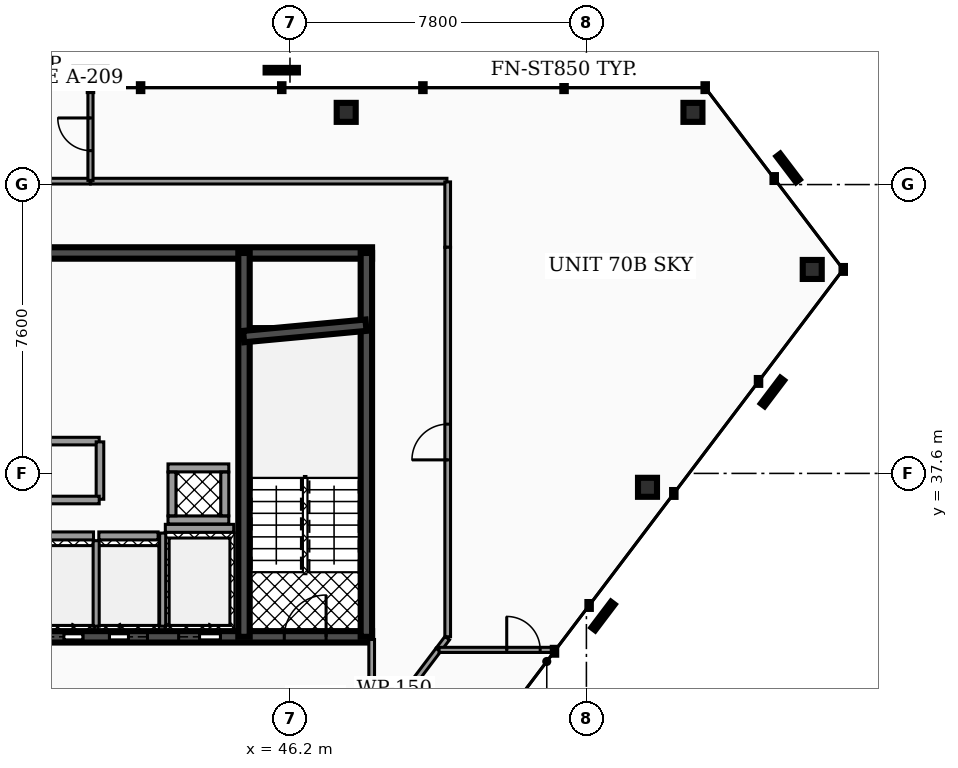
"""IFC4 building model, lengths in metres.
Left out: names, types, materials, properties, quantities, classifications, styles, units other than length and angle.
Written with IfcOpenShell. Run it as: python <this file> out.ifc"""

import sys

from ifc_helpers import new_model, si_unit, direction, frame, frame_2d, origin, origin_2d, place, context, subcontext, project, spatial, rectangle, hollow_rectangle, extrude, element, fill, save


model = new_model("IFC4")
c1 = context("Model", 3, precision=1e-05, world=origin(), true_north=direction((0.0, 1.0)))
c2 = subcontext(c1, "Body", "Model", "MODEL_VIEW")
j1 = project(units=[si_unit("LENGTHUNIT", "METRE"), si_unit("PLANEANGLEUNIT", "RADIAN")], contexts=[c1])
p1 = place(None, origin())
s1 = spatial("IfcSite", under=j1, at=p1, CompositionType="ELEMENT")
p2 = place(p1, origin())
s2 = spatial("IfcBuilding", under=s1, at=p2, CompositionType="ELEMENT")
p3 = place(p2, frame((0.0, 0.0, 275.4)))
s3 = spatial("IfcBuildingStorey", under=s2, at=p3, CompositionType="ELEMENT", Elevation=275.4)
p4 = place(p3, frame((28.5, 43.4, 0.0), z_axis=(0.0, 0.0, 1.0), x_axis=(1.0, 0.0, 0.0)))
e1 = element("IfcWall", 1, at=p4, inside=s3, PredefinedType="SHEAR", context=c2, shape_type="SweptSolid", body=[
    extrude(rectangle(XDim=19.86, YDim=0.3, at=frame_2d((9.93, 0.0))), origin(), (0.0, 0.0, 1.0), 3.18),
])
p5 = place(p3, frame((28.5, 33.3, 0.0), z_axis=(0.0, 0.0, 1.0), x_axis=(1.0, 0.0, 0.0)))
e2 = element("IfcWall", 2, at=p5, inside=s3, PredefinedType="SHEAR", context=c2, shape_type="SweptSolid", body=[
    extrude(rectangle(XDim=19.86, YDim=0.3, at=frame_2d((9.93, 0.0))), origin(), (0.0, 0.0, 1.0), 3.18),
])
p6 = place(p5, frame((3.93, 0.0, 0.0)))
e3 = element("IfcOpeningElement", 3, at=p6, cuts=e2, PredefinedType="OPENING", context=c2, shape_type="SweptSolid", body=[
    extrude(rectangle(XDim=1.1, YDim=2.15, at=frame_2d((0.55, 1.075))), frame((0.0, 0.16, 0.0), z_axis=(0.0, -1.0, 0.0), x_axis=(1.0, 0.0, 0.0)), (0.0, 0.0, 1.0), 0.32),
])
p7 = place(p5, frame((14.77, 0.0, 0.0)))
e4 = element("IfcOpeningElement", 4, at=p7, cuts=e2, PredefinedType="OPENING", context=c2, shape_type="SweptSolid", body=[
    extrude(rectangle(XDim=1.1, YDim=2.15, at=frame_2d((0.55, 1.075))), frame((0.0, 0.16, 0.0), z_axis=(0.0, -1.0, 0.0), x_axis=(1.0, 0.0, 0.0)), (0.0, 0.0, 1.0), 0.32),
])
p8 = place(p5, frame((11.25, 0.0, 0.0)))
e5 = element("IfcOpeningElement", 5, at=p8, cuts=e2, PredefinedType="OPENING", context=c2, shape_type="SweptSolid", body=[
    extrude(rectangle(XDim=1.0, YDim=2.1, at=frame_2d((0.5, 1.05))), frame((0.0, 0.16, 0.0), z_axis=(0.0, -1.0, 0.0), x_axis=(1.0, 0.0, 0.0)), (0.0, 0.0, 1.0), 0.32),
])
p9 = place(p5, frame((12.95, 0.0, 0.0)))
e6 = element("IfcOpeningElement", 6, at=p9, cuts=e2, PredefinedType="OPENING", context=c2, shape_type="SweptSolid", body=[
    extrude(rectangle(XDim=1.0, YDim=2.1, at=frame_2d((0.5, 1.05))), frame((0.0, 0.16, 0.0), z_axis=(0.0, -1.0, 0.0), x_axis=(1.0, 0.0, 0.0)), (0.0, 0.0, 1.0), 0.32),
])
p10 = place(p5, frame((5.85, 0.0, 0.0)))
e7 = element("IfcOpeningElement", 7, at=p10, cuts=e2, PredefinedType="OPENING", context=c2, shape_type="SweptSolid", body=[
    extrude(rectangle(XDim=1.0, YDim=2.1, at=frame_2d((0.5, 1.05))), frame((0.0, 0.16, 0.0), z_axis=(0.0, -1.0, 0.0), x_axis=(1.0, 0.0, 0.0)), (0.0, 0.0, 1.0), 0.32),
])
p11 = place(p5, frame((1.21, 0.0, 0.0)))
e8 = element("IfcOpeningElement", 8, at=p11, cuts=e2, PredefinedType="OPENING", context=c2, shape_type="SweptSolid", body=[
    extrude(rectangle(XDim=1.1, YDim=2.2, at=frame_2d((0.55, 1.1))), frame((0.0, 0.16, 0.0), z_axis=(0.0, -1.0, 0.0), x_axis=(1.0, 0.0, 0.0)), (0.0, 0.0, 1.0), 0.32),
])
p12 = place(p5, frame((9.34, 0.0, 0.0)))
e9 = element("IfcOpeningElement", 9, at=p12, cuts=e2, PredefinedType="OPENING", context=c2, shape_type="SweptSolid", body=[
    extrude(rectangle(XDim=1.12, YDim=2.05, at=frame_2d((0.56, 1.025))), frame((0.0, 0.16, 0.0), z_axis=(0.0, -1.0, 0.0), x_axis=(1.0, 0.0, 0.0)), (0.0, 0.0, 1.0), 0.32),
])
p13 = place(p5, frame((17.55, 0.0, 0.0)))
e10 = element("IfcOpeningElement", 10, at=p13, cuts=e2, PredefinedType="OPENING", context=c2, shape_type="SweptSolid", body=[
    extrude(rectangle(XDim=1.1, YDim=2.2, at=frame_2d((0.55, 1.1))), frame((0.0, 0.16, 0.0), z_axis=(0.0, -1.0, 0.0), x_axis=(1.0, 0.0, 0.0)), (0.0, 0.0, 1.0), 0.32),
])
for number, where, z_axis, x_axis in (
    (11, (44.99, 33.3, 0.0), (0.0, 0.0, 1.0), (0.0, 1.0, 0.0)),
    (12, (48.21, 33.3, 0.0), (0.0, 0.0, 1.0), (0.0, 1.0, 0.0)),
):
    element("IfcWall", number, at=place(p3, frame(where, z_axis=z_axis, x_axis=x_axis)), inside=s3, PredefinedType="SHEAR", context=c2, shape_type="SweptSolid", body=[
        extrude(rectangle(XDim=10.1, YDim=0.3, at=frame_2d((5.05, 0.0))), origin(), (0.0, 0.0, 1.0), 3.18),
    ])
p14 = place(p3, frame((44.98, 41.2, 0.0), z_axis=(0.0, 0.0, 1.0), x_axis=(0.995686468965, 0.09278176286, 0.0)))
e13 = element("IfcWall", 13, at=p14, inside=s3, PredefinedType="SHEAR", context=c2, shape_type="SweptSolid", body=[
    extrude(rectangle(XDim=3.234, YDim=0.3, at=frame_2d((1.617, 0.0))), origin(), (0.0, 0.0, 1.0), 3.18),
])
p15 = place(p3, frame((56.804, 47.1, 0.0), z_axis=(-0.053472483911, -0.03661869242, 0.997897672525), x_axis=(0.565022872756, -0.82507524097, 0.0)))
e14 = element("IfcColumn", 14, at=p15, inside=s3, PredefinedType="COLUMN", context=c2, shape_type="SweptSolid", body=[
    extrude(hollow_rectangle(XDim=0.5, YDim=0.5, WallThickness=0.025, at=origin_2d()), origin(), (0.0, 0.0, 1.0), 3.187),
])
p16 = place(p3, frame((47.679, 47.1, 0.0), z_axis=(-0.051103977412, -0.036623240185, 0.99802160386), x_axis=(0.582505522768, -0.812826744113, 0.0)))
e15 = element("IfcColumn", 15, at=p16, inside=s3, PredefinedType="COLUMN", context=c2, shape_type="SweptSolid", body=[
    extrude(hollow_rectangle(XDim=0.5, YDim=0.5, WallThickness=0.025, at=origin_2d()), origin(), (0.0, 0.0, 1.0), 3.187),
])
p17 = place(p3, frame((51.273, 31.502, 0.0), z_axis=(-0.14102254439, 0.118763769326, 0.98285696267), x_axis=(-0.644160950514, -0.76488997237, 0.0)))
e16 = element("IfcColumn", 16, at=p17, inside=s3, PredefinedType="COLUMN", context=c2, shape_type="SweptSolid", body=[
    extrude(hollow_rectangle(XDim=0.5, YDim=0.5, WallThickness=0.025, at=origin_2d()), origin(), (0.0, 0.0, 1.0), 3.236),
])
p18 = place(p3, frame((55.608, 37.234, 0.0), z_axis=(-0.148972076952, 0.11148391379, 0.982536847785), x_axis=(-0.599156469531, -0.800631953534, 0.0)))
e17 = element("IfcColumn", 17, at=p18, inside=s3, PredefinedType="COLUMN", context=c2, shape_type="SweptSolid", body=[
    extrude(hollow_rectangle(XDim=0.5, YDim=0.5, WallThickness=0.025, at=origin_2d()), origin(), (0.0, 0.0, 1.0), 3.237),
])
p19 = place(p3, frame((59.943, 42.967, 0.0), z_axis=(-0.156898205483, 0.104196693886, 0.982102847007), x_axis=(-0.55322127243, -0.83303434727, 0.0)))
e18 = element("IfcColumn", 18, at=p19, inside=s3, PredefinedType="COLUMN", context=c2, shape_type="SweptSolid", body=[
    extrude(hollow_rectangle(XDim=0.5, YDim=0.5, WallThickness=0.025, at=origin_2d()), origin(), (0.0, 0.0, 1.0), 3.238),
])
p20 = place(p3, frame((42.92, 36.155, 0.0), z_axis=(0.0, 0.0, 1.0), x_axis=(1.0, 0.0, 0.0)))
e19 = element("IfcWall", 19, at=p20, inside=s3, PredefinedType="SOLIDWALL", context=c2, shape_type="SweptSolid", body=[
    extrude(rectangle(XDim=1.8, YDim=0.21, at=frame_2d((0.9, 0.0))), origin(), (0.0, 0.0, 1.0), 3.18),
])
p21 = place(p3, frame((42.85, 33.58, 0.0), z_axis=(0.0, 0.0, 1.0), x_axis=(0.0, 1.0, 0.0)))
e20 = element("IfcWall", 20, at=p21, inside=s3, PredefinedType="SOLIDWALL", context=c2, shape_type="SweptSolid", body=[
    extrude(rectangle(XDim=2.45, YDim=0.16, at=frame_2d((1.225, 0.0))), origin(), (0.0, 0.0, 1.0), 3.18),
])
p22 = place(p3, frame((39.47, 35.955, 0.0), z_axis=(0.0, 0.0, 1.0), x_axis=(1.0, 0.0, 0.0)))
e21 = element("IfcWall", 21, at=p22, inside=s3, PredefinedType="SOLIDWALL", context=c2, shape_type="SweptSolid", body=[
    extrude(rectangle(XDim=1.56, YDim=0.21, at=frame_2d((0.78, 0.0))), origin(), (0.0, 0.0, 1.0), 3.18),
])
p23 = place(p3, frame((41.1, 33.58, 0.0), z_axis=(0.0, 0.0, 1.0), x_axis=(0.0, 1.0, 0.0)))
e22 = element("IfcWall", 22, at=p23, inside=s3, PredefinedType="SOLIDWALL", context=c2, shape_type="SweptSolid", body=[
    extrude(rectangle(XDim=2.25, YDim=0.16, at=frame_2d((1.125, 0.0))), origin(), (0.0, 0.0, 1.0), 3.18),
])
p24 = place(p3, frame((41.17, 35.955, 0.0), z_axis=(0.0, 0.0, 1.0), x_axis=(1.0, 0.0, 0.0)))
e23 = element("IfcWall", 23, at=p24, inside=s3, PredefinedType="SOLIDWALL", context=c2, shape_type="SweptSolid", body=[
    extrude(rectangle(XDim=1.56, YDim=0.21, at=frame_2d((0.78, 0.0))), origin(), (0.0, 0.0, 1.0), 3.18),
])
for number, where, z_axis, x_axis in (
    (24, (42.99, 36.375, 0.0), (0.0, 0.0, 1.0), (1.0, 0.0, 0.0)),
    (25, (42.99, 37.745, 0.0), (0.0, 0.0, 1.0), (1.0, 0.0, 0.0)),
):
    element("IfcWall", number, at=place(p3, frame(where, z_axis=z_axis, x_axis=x_axis)), inside=s3, PredefinedType="SOLIDWALL", context=c2, shape_type="SweptSolid", body=[
        extrude(rectangle(XDim=1.6, YDim=0.21, at=frame_2d((0.8, 0.0))), origin(), (0.0, 0.0, 1.0), 3.18),
    ])
for number, where, z_axis, x_axis in (
    (26, (43.095, 36.485, 0.0), (0.0, 0.0, 1.0), (0.0, 1.0, 0.0)),
    (27, (44.485, 36.485, 0.0), (0.0, 0.0, 1.0), (0.0, 1.0, 0.0)),
):
    element("IfcWall", number, at=place(p3, frame(where, z_axis=z_axis, x_axis=x_axis)), inside=s3, PredefinedType="SOLIDWALL", context=c2, shape_type="SweptSolid", body=[
        extrude(rectangle(XDim=1.15, YDim=0.21, at=frame_2d((0.575, 0.0))), origin(), (0.0, 0.0, 1.0), 3.18),
    ])
p25 = place(p3, frame((39.27, 38.45, 0.0), z_axis=(0.0, 0.0, 1.0), x_axis=(1.0, 0.0, 0.0)))
e28 = element("IfcWall", 28, at=p25, inside=s3, PredefinedType="PARTITIONING", context=c2, shape_type="SweptSolid", body=[
    extrude(rectangle(XDim=1.91, YDim=0.2, at=frame_2d((0.955, 0.0))), origin(), (0.0, 0.0, 1.0), 2.235),
])
p26 = place(p3, frame((41.2, 36.92, 0.0), z_axis=(0.0, 0.0, 1.0), x_axis=(0.0, 1.0, 0.0)))
e29 = element("IfcWall", 29, at=p26, inside=s3, PredefinedType="PARTITIONING", context=c2, shape_type="SweptSolid", body=[
    extrude(rectangle(XDim=1.51, YDim=0.2, at=frame_2d((0.755, 0.0))), origin(), (0.0, 0.0, 1.0), 2.235),
])
p27 = place(p3, frame((39.27, 36.9, 0.0), z_axis=(0.0, 0.0, 1.0), x_axis=(1.0, 0.0, 0.0)))
e30 = element("IfcWall", 30, at=p27, inside=s3, PredefinedType="PARTITIONING", context=c2, shape_type="SweptSolid", body=[
    extrude(rectangle(XDim=1.91, YDim=0.2, at=frame_2d((0.955, 0.0))), origin(), (0.0, 0.0, 1.0), 2.235),
])
p28 = place(p3, frame((48.35, 30.643, 0.0), z_axis=(0.0, 0.0, 1.0), x_axis=(0.0, 1.0, 0.0)))
e31 = element("IfcWall", 31, at=p28, inside=s3, PredefinedType="PARTITIONING", context=c2, shape_type="SweptSolid", body=[
    extrude(rectangle(XDim=2.587, YDim=0.15, at=frame_2d((1.294, 0.0))), origin(), (0.0, 0.0, 1.0), 2.235),
])
p29 = place(p3, frame((40.955, 45.29, 0.0), z_axis=(0.0, 0.0, 1.0), x_axis=(1.0, 0.0, 0.0)))
e32 = element("IfcWall", 32, at=p29, inside=s3, PredefinedType="PARTITIONING", context=c2, shape_type="SweptSolid", body=[
    extrude(rectangle(XDim=9.375, YDim=0.15, at=frame_2d((4.688, 0.0))), origin(), (0.0, 0.0, 1.0), 2.235),
])
p30 = place(p3, frame((50.35, 43.55, 0.0), z_axis=(0.0, 0.0, 1.0), x_axis=(0.0, 1.0, 0.0)))
e33 = element("IfcWall", 33, at=p30, inside=s3, PredefinedType="PARTITIONING", context=c2, shape_type="SweptSolid", body=[
    extrude(rectangle(XDim=1.72, YDim=0.15, at=frame_2d((0.86, 0.0))), origin(), (0.0, 0.0, 1.0), 2.235),
])
p31 = place(p3, frame((50.35, 33.302, 0.0), z_axis=(0.0, 0.0, 1.0), x_axis=(0.0, 1.0, 0.0)))
e34 = element("IfcWall", 34, at=p31, inside=s3, PredefinedType="PARTITIONING", context=c2, shape_type="SweptSolid", body=[
    extrude(rectangle(XDim=10.248, YDim=0.15, at=frame_2d((5.124, 0.0))), origin(), (0.0, 0.0, 1.0), 2.235),
])
p32 = place(p31, frame((4.654, 0.0, 0.0)))
e35 = element("IfcOpeningElement", 35, at=p32, cuts=e34, PredefinedType="OPENING", context=c2, shape_type="SweptSolid", body=[
    extrude(rectangle(XDim=0.94, YDim=2.05, at=frame_2d((0.47, 1.025))), frame((0.0, 0.085, 0.0), z_axis=(0.0, -1.0, 0.0), x_axis=(1.0, 0.0, 0.0)), (0.0, 0.0, 1.0), 0.17),
])
p33 = place(p3, frame((50.107, 32.96, 0.0), z_axis=(0.0, 0.0, 1.0), x_axis=(0.602950173728, 0.797778846549, 0.0)))
e36 = element("IfcWall", 36, at=p33, inside=s3, PredefinedType="PARTITIONING", context=c2, shape_type="SweptSolid", body=[
    extrude(rectangle(XDim=0.384, YDim=0.15, at=frame_2d((0.192, 0.0))), origin(), (0.0, 0.0, 1.0), 2.235),
])
p34 = place(p3, frame((48.362, 30.654, 0.0), z_axis=(0.0, 0.0, 1.0), x_axis=(0.603189668488, 0.79759778324, 0.0)))
e37 = element("IfcWall", 37, at=p34, inside=s3, PredefinedType="PARTITIONING", context=c2, shape_type="SweptSolid", body=[
    extrude(rectangle(XDim=2.886, YDim=0.15, at=frame_2d((1.443, 0.0))), origin(), (0.0, 0.0, 1.0), 2.235),
])
p35 = place(p3, frame((38.405, 45.29, 0.0), z_axis=(0.0, 0.0, 1.0), x_axis=(1.0, 0.0, 0.0)))
e38 = element("IfcWall", 38, at=p35, inside=s3, PredefinedType="PARTITIONING", context=c2, shape_type="SweptSolid", body=[
    extrude(rectangle(XDim=2.54, YDim=0.15, at=frame_2d((1.27, 0.0))), origin(), (0.0, 0.0, 1.0), 2.235),
])
p36 = place(p3, frame((50.124, 32.956, 0.0), z_axis=(0.0, 0.0, 1.0), x_axis=(1.0, 0.0, 0.0)))
e39 = element("IfcWall", 39, at=p36, inside=s3, PredefinedType="PARTITIONING", context=c2, shape_type="SweptSolid", body=[
    extrude(rectangle(XDim=3.049, YDim=0.135, at=frame_2d((1.525, 0.0))), origin(), (0.0, 0.0, 1.0), 2.235),
])
p37 = place(p36, frame((1.78, 0.0, 0.0)))
e40 = element("IfcOpeningElement", 40, at=p37, cuts=e39, PredefinedType="OPENING", context=c2, shape_type="SweptSolid", body=[
    extrude(rectangle(XDim=0.88, YDim=2.05, at=frame_2d((0.44, 1.025))), frame((0.0, 0.077, 0.0), z_axis=(0.0, -1.0, 0.0), x_axis=(1.0, 0.0, 0.0)), (0.0, 0.0, 1.0), 0.155),
])
p38 = place(p3, frame((40.95, 45.31, 0.0), z_axis=(0.0, 0.0, 1.0), x_axis=(0.0, 1.0, 0.0)))
e41 = element("IfcWall", 41, at=p38, inside=s3, PredefinedType="PARTITIONING", context=c2, shape_type="SweptSolid", body=[
    extrude(rectangle(XDim=2.425, YDim=0.135, at=frame_2d((1.212, 0.0))), origin(), (0.0, 0.0, 1.0), 2.235),
])
p39 = place(p38, frame((0.782, 0.0, 0.0)))
e42 = element("IfcOpeningElement", 42, at=p39, cuts=e41, PredefinedType="OPENING", context=c2, shape_type="SweptSolid", body=[
    extrude(rectangle(XDim=0.86, YDim=2.05, at=frame_2d((0.43, 1.025))), frame((0.0, 0.077, 0.0), z_axis=(0.0, -1.0, 0.0), x_axis=(1.0, 0.0, 0.0)), (0.0, 0.0, 1.0), 0.155),
])
p40 = place(p7, origin())
e43 = element("IfcDoor", 43, at=p40, inside=s3, OperationType="SLIDING_TO_RIGHT", PredefinedType="DOOR", context=c2, shape_type="SweptSolid", body=[
    extrude(rectangle(XDim=1.1, YDim=2.15, at=frame_2d((0.55, 1.075))), frame((0.0, 0.025, 0.0), z_axis=(0.0, -1.0, 0.0), x_axis=(1.0, 0.0, 0.0)), (0.0, 0.0, 1.0), 0.05),
])
fill(e4, e43)
p41 = place(p8, origin())
e44 = element("IfcDoor", 44, at=p41, inside=s3, OperationType="SLIDING_TO_RIGHT", PredefinedType="DOOR", context=c2, shape_type="SweptSolid", body=[
    extrude(rectangle(XDim=1.0, YDim=2.1, at=frame_2d((0.5, 1.05))), frame((0.0, 0.025, 0.0), z_axis=(0.0, -1.0, 0.0), x_axis=(1.0, 0.0, 0.0)), (0.0, 0.0, 1.0), 0.05),
])
fill(e5, e44)
p42 = place(p9, origin())
e45 = element("IfcDoor", 45, at=p42, inside=s3, OperationType="SLIDING_TO_LEFT", PredefinedType="DOOR", context=c2, shape_type="SweptSolid", body=[
    extrude(rectangle(XDim=1.0, YDim=2.1, at=frame_2d((0.5, 1.05))), frame((0.0, 0.025, 0.0), z_axis=(0.0, -1.0, 0.0), x_axis=(1.0, 0.0, 0.0)), (0.0, 0.0, 1.0), 0.05),
])
fill(e6, e45)
p43 = place(p13, origin())
e46 = element("IfcDoor", 46, at=p43, inside=s3, OperationType="SINGLE_SWING_RIGHT", PredefinedType="DOOR", context=c2, shape_type="SweptSolid", body=[
    extrude(rectangle(XDim=1.1, YDim=2.2, at=frame_2d((0.55, 1.1))), frame((0.0, 0.025, 0.0), z_axis=(0.0, -1.0, 0.0), x_axis=(1.0, 0.0, 0.0)), (0.0, 0.0, 1.0), 0.05),
])
fill(e10, e46)
p44 = place(p32, origin())
e47 = element("IfcDoor", 47, at=p44, inside=s3, OperationType="SINGLE_SWING_LEFT", PredefinedType="DOOR", context=c2, shape_type="SweptSolid", body=[
    extrude(rectangle(XDim=0.94, YDim=2.05, at=frame_2d((0.47, 1.025))), frame((0.0, 0.025, 0.0), z_axis=(0.0, -1.0, 0.0), x_axis=(1.0, 0.0, 0.0)), (0.0, 0.0, 1.0), 0.05),
])
fill(e35, e47)
p45 = place(p37, origin())
e48 = element("IfcDoor", 48, at=p45, inside=s3, OperationType="SINGLE_SWING_LEFT", PredefinedType="DOOR", context=c2, shape_type="SweptSolid", body=[
    extrude(rectangle(XDim=0.88, YDim=2.05, at=frame_2d((0.44, 1.025))), frame((0.0, 0.025, 0.0), z_axis=(0.0, -1.0, 0.0), x_axis=(1.0, 0.0, 0.0)), (0.0, 0.0, 1.0), 0.05),
])
fill(e40, e48)
p46 = place(p39, origin())
e49 = element("IfcDoor", 49, at=p46, inside=s3, OperationType="SINGLE_SWING_RIGHT", PredefinedType="DOOR", context=c2, shape_type="SweptSolid", body=[
    extrude(rectangle(XDim=0.86, YDim=2.05, at=frame_2d((0.43, 1.025))), frame((0.0, 0.025, 0.0), z_axis=(0.0, -1.0, 0.0), x_axis=(1.0, 0.0, 0.0)), (0.0, 0.0, 1.0), 0.05),
])
fill(e42, e49)
save(model, sys.argv[1])
